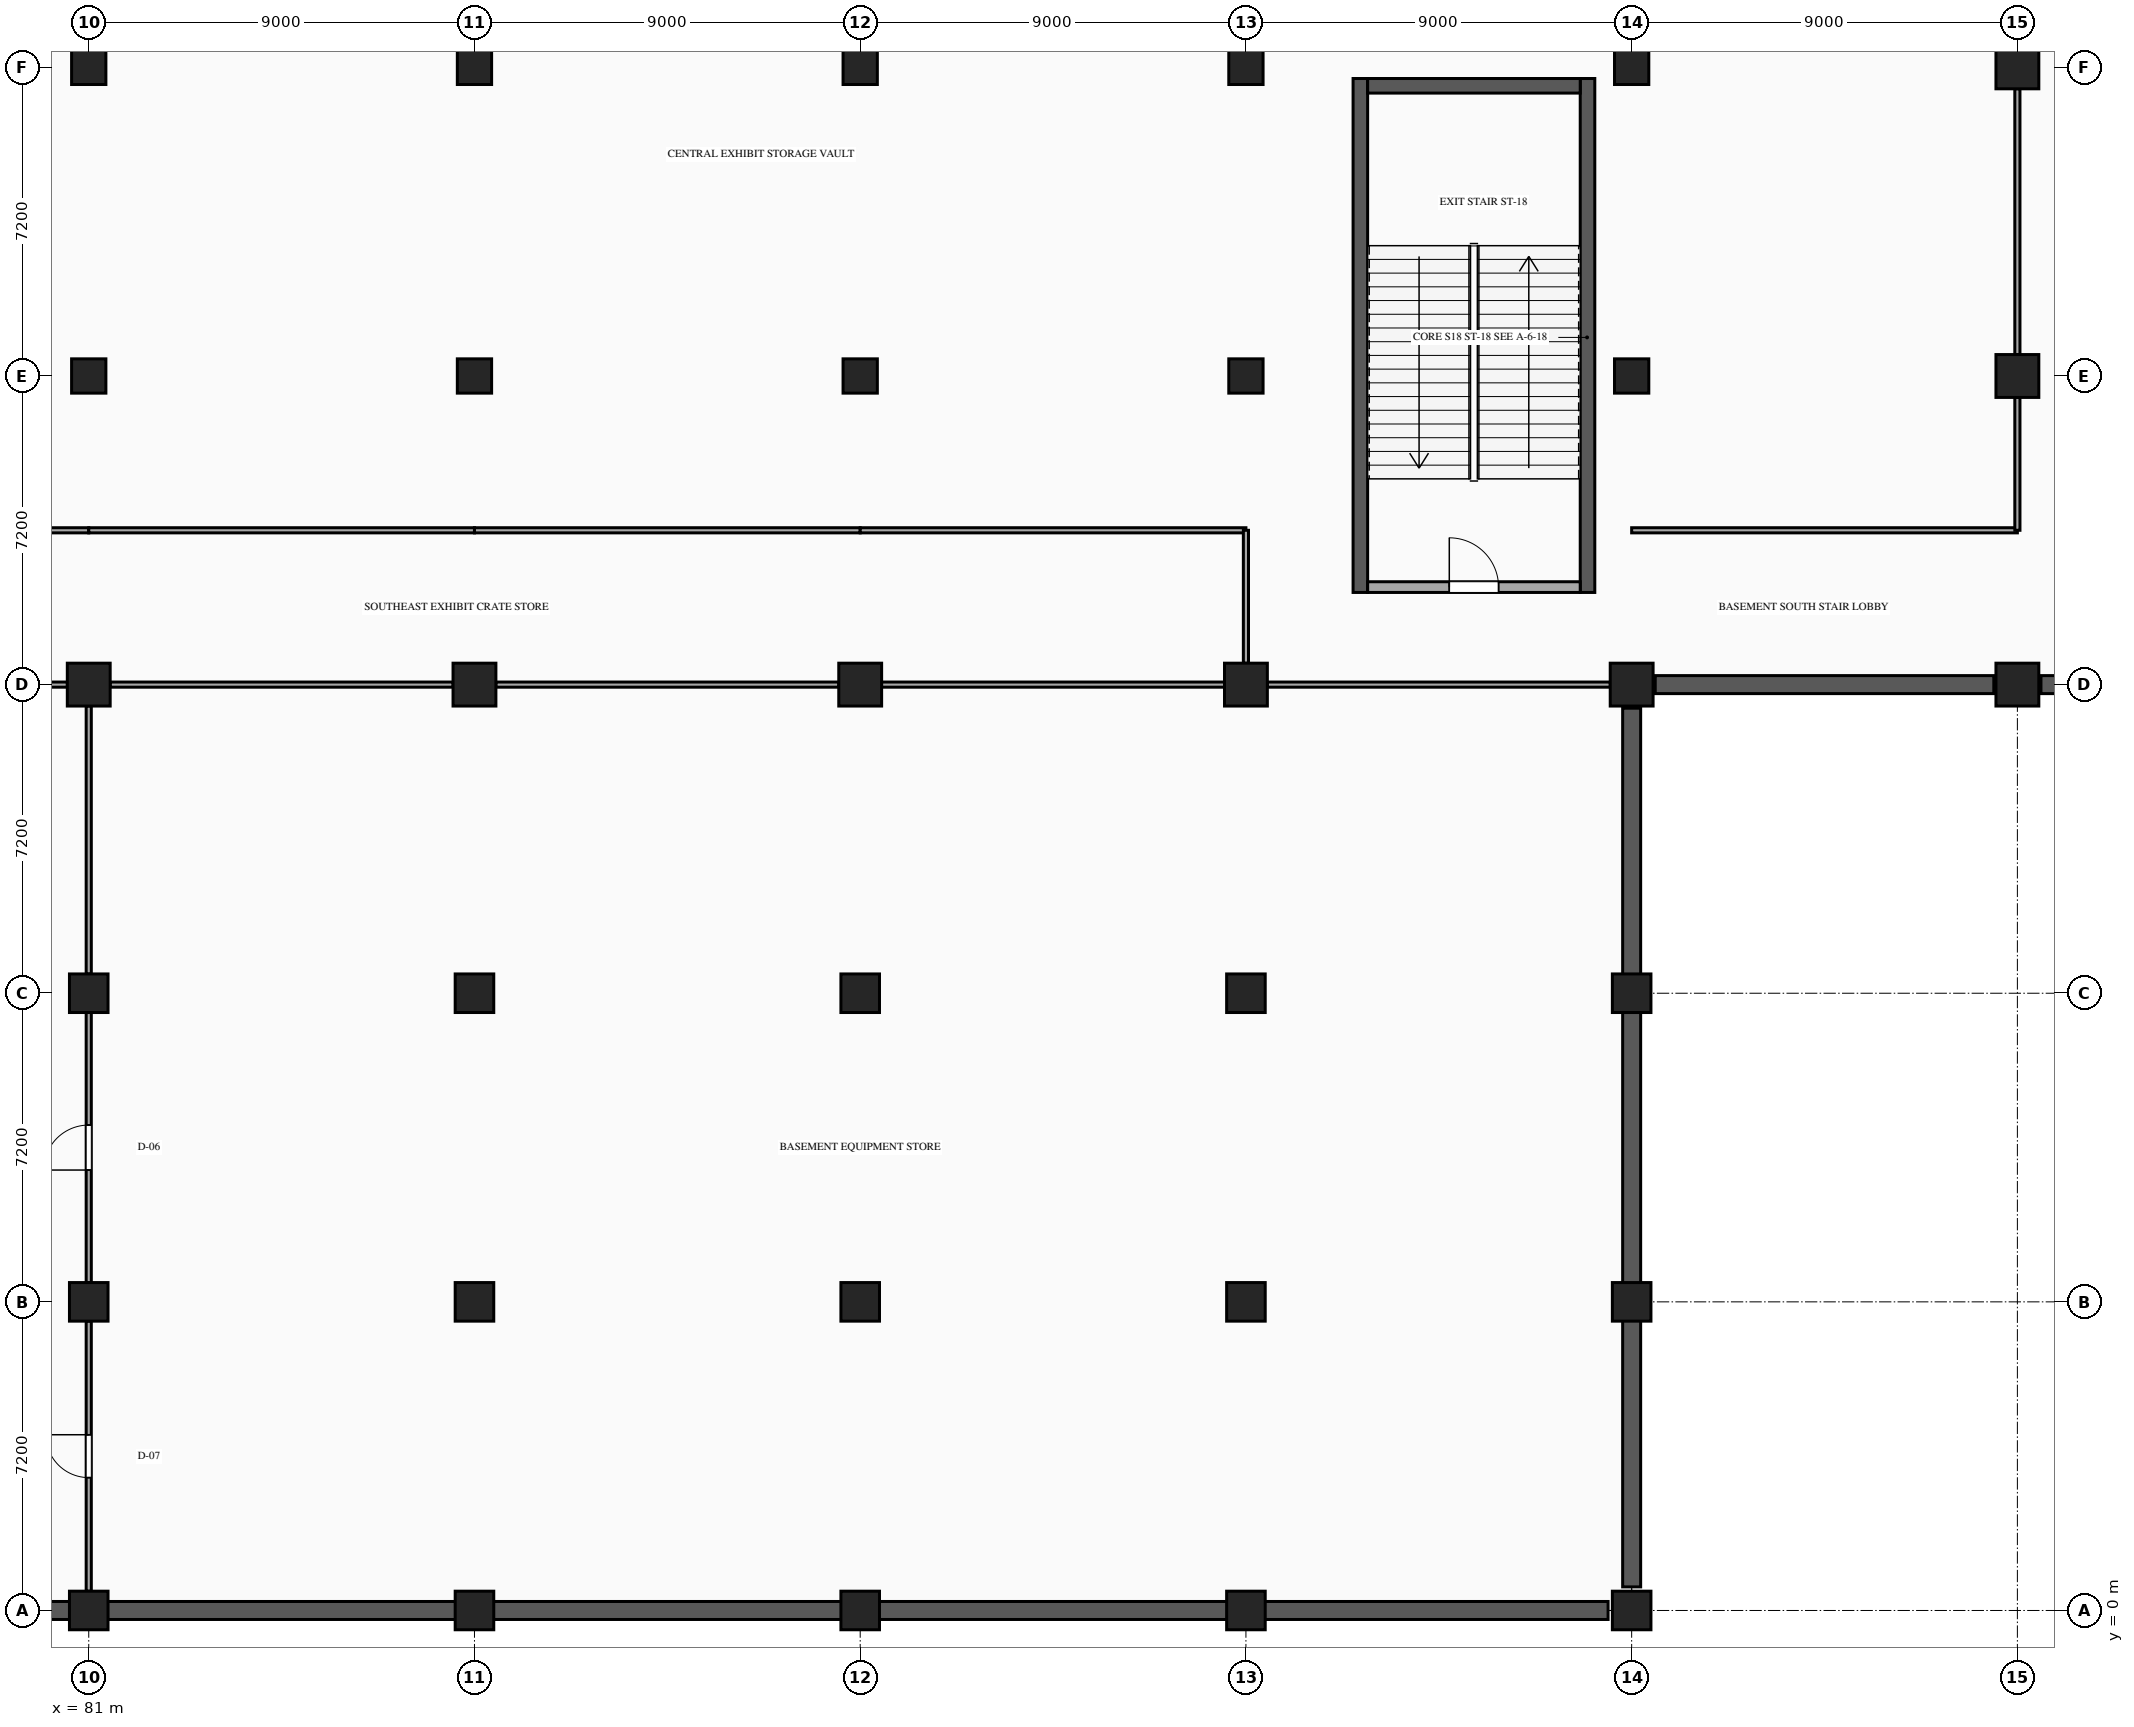
"""IFC4 building model, lengths in metres.
Left out: names, types, materials, properties, quantities, classifications, styles, units other than length and angle.
Written with IfcOpenShell. Run it as: python <this file> out.ifc"""

import sys

from ifc_helpers import new_model, si_unit, direction, frame, frame_2d, origin, origin_2d, place, context, subcontext, project, spatial, rectangle, extrude, element, fill, save


model = new_model("IFC4")
c1 = context("Model", 3, precision=1e-05, world=origin(), true_north=direction((0.0, 1.0)))
c2 = subcontext(c1, "Body", "Model", "MODEL_VIEW")
j1 = project(units=[si_unit("LENGTHUNIT", "METRE"), si_unit("PLANEANGLEUNIT", "RADIAN")], contexts=[c1])
p1 = place(None, origin())
s1 = spatial("IfcSite", under=j1, at=p1, CompositionType="ELEMENT")
p2 = place(p1, origin())
s2 = spatial("IfcBuilding", under=s1, at=p2, CompositionType="ELEMENT")
p3 = place(p2, frame((0.0, 0.0, -5.4)))
s3 = spatial("IfcBuildingStorey", under=s2, at=p3, CompositionType="ELEMENT", Elevation=-5.4)
for number, where, z_axis, x_axis in (
    (1, (81.0, 0.0, 0.0), (0.0, 0.0, 1.0), (1.0, 0.0, 0.0)),
    (2, (81.0, 7.2, 0.0), (0.0, 0.0, 1.0), (1.0, 0.0, 0.0)),
    (3, (81.0, 14.4, 0.0), (0.0, 0.0, 1.0), (1.0, 0.0, 0.0)),
):
    element("IfcColumn", number, at=place(p3, frame(where, z_axis=z_axis, x_axis=x_axis)), inside=s3, PredefinedType="COLUMN", context=c2, shape_type="SweptSolid", body=[
        extrude(rectangle(XDim=0.9, YDim=0.9, at=origin_2d()), origin(), (0.0, 0.0, 1.0), 5.4),
    ])
p4 = place(p3, frame((81.0, 21.6, 0.0), z_axis=(0.0, 0.0, 1.0), x_axis=(1.0, 0.0, 0.0)))
e4 = element("IfcColumn", 4, at=p4, inside=s3, PredefinedType="COLUMN", context=c2, shape_type="SweptSolid", body=[
    extrude(rectangle(XDim=1.0, YDim=1.0, at=origin_2d()), origin(), (0.0, 0.0, 1.0), 5.4),
])
for number, where, z_axis, x_axis in (
    (5, (81.0, 28.8, 0.0), (0.0, 0.0, 1.0), (1.0, 0.0, 0.0)),
    (6, (81.0, 36.0, 0.0), (0.0, 0.0, 1.0), (1.0, 0.0, 0.0)),
):
    element("IfcColumn", number, at=place(p3, frame(where, z_axis=z_axis, x_axis=x_axis)), inside=s3, PredefinedType="COLUMN", context=c2, shape_type="SweptSolid", body=[
        extrude(rectangle(XDim=0.8, YDim=0.8, at=origin_2d()), origin(), (0.0, 0.0, 1.0), 5.4),
    ])
for number, where, z_axis, x_axis in (
    (7, (90.0, 0.0, 0.0), (0.0, 0.0, 1.0), (1.0, 0.0, 0.0)),
    (8, (90.0, 7.2, 0.0), (0.0, 0.0, 1.0), (1.0, 0.0, 0.0)),
    (9, (90.0, 14.4, 0.0), (0.0, 0.0, 1.0), (1.0, 0.0, 0.0)),
):
    element("IfcColumn", number, at=place(p3, frame(where, z_axis=z_axis, x_axis=x_axis)), inside=s3, PredefinedType="COLUMN", context=c2, shape_type="SweptSolid", body=[
        extrude(rectangle(XDim=0.9, YDim=0.9, at=origin_2d()), origin(), (0.0, 0.0, 1.0), 5.4),
    ])
p5 = place(p3, frame((90.0, 21.6, 0.0), z_axis=(0.0, 0.0, 1.0), x_axis=(1.0, 0.0, 0.0)))
e10 = element("IfcColumn", 10, at=p5, inside=s3, PredefinedType="COLUMN", context=c2, shape_type="SweptSolid", body=[
    extrude(rectangle(XDim=1.0, YDim=1.0, at=origin_2d()), origin(), (0.0, 0.0, 1.0), 5.4),
])
for number, where, z_axis, x_axis in (
    (11, (90.0, 28.8, 0.0), (0.0, 0.0, 1.0), (1.0, 0.0, 0.0)),
    (12, (90.0, 36.0, 0.0), (0.0, 0.0, 1.0), (1.0, 0.0, 0.0)),
):
    element("IfcColumn", number, at=place(p3, frame(where, z_axis=z_axis, x_axis=x_axis)), inside=s3, PredefinedType="COLUMN", context=c2, shape_type="SweptSolid", body=[
        extrude(rectangle(XDim=0.8, YDim=0.8, at=origin_2d()), origin(), (0.0, 0.0, 1.0), 5.4),
    ])
for number, where, z_axis, x_axis in (
    (13, (99.0, 0.0, 0.0), (0.0, 0.0, 1.0), (1.0, 0.0, 0.0)),
    (14, (99.0, 7.2, 0.0), (0.0, 0.0, 1.0), (1.0, 0.0, 0.0)),
    (15, (99.0, 14.4, 0.0), (0.0, 0.0, 1.0), (1.0, 0.0, 0.0)),
):
    element("IfcColumn", number, at=place(p3, frame(where, z_axis=z_axis, x_axis=x_axis)), inside=s3, PredefinedType="COLUMN", context=c2, shape_type="SweptSolid", body=[
        extrude(rectangle(XDim=0.9, YDim=0.9, at=origin_2d()), origin(), (0.0, 0.0, 1.0), 5.4),
    ])
p6 = place(p3, frame((99.0, 21.6, 0.0), z_axis=(0.0, 0.0, 1.0), x_axis=(1.0, 0.0, 0.0)))
e16 = element("IfcColumn", 16, at=p6, inside=s3, PredefinedType="COLUMN", context=c2, shape_type="SweptSolid", body=[
    extrude(rectangle(XDim=1.0, YDim=1.0, at=origin_2d()), origin(), (0.0, 0.0, 1.0), 5.4),
])
for number, where, z_axis, x_axis in (
    (17, (99.0, 28.8, 0.0), (0.0, 0.0, 1.0), (1.0, 0.0, 0.0)),
    (18, (99.0, 36.0, 0.0), (0.0, 0.0, 1.0), (1.0, 0.0, 0.0)),
):
    element("IfcColumn", number, at=place(p3, frame(where, z_axis=z_axis, x_axis=x_axis)), inside=s3, PredefinedType="COLUMN", context=c2, shape_type="SweptSolid", body=[
        extrude(rectangle(XDim=0.8, YDim=0.8, at=origin_2d()), origin(), (0.0, 0.0, 1.0), 5.4),
    ])
for number, where, z_axis, x_axis in (
    (19, (108.0, 0.0, 0.0), (0.0, 0.0, 1.0), (1.0, 0.0, 0.0)),
    (20, (108.0, 7.2, 0.0), (0.0, 0.0, 1.0), (1.0, 0.0, 0.0)),
    (21, (108.0, 14.4, 0.0), (0.0, 0.0, 1.0), (1.0, 0.0, 0.0)),
):
    element("IfcColumn", number, at=place(p3, frame(where, z_axis=z_axis, x_axis=x_axis)), inside=s3, PredefinedType="COLUMN", context=c2, shape_type="SweptSolid", body=[
        extrude(rectangle(XDim=0.9, YDim=0.9, at=origin_2d()), origin(), (0.0, 0.0, 1.0), 5.4),
    ])
p7 = place(p3, frame((108.0, 21.6, 0.0), z_axis=(0.0, 0.0, 1.0), x_axis=(1.0, 0.0, 0.0)))
e22 = element("IfcColumn", 22, at=p7, inside=s3, PredefinedType="COLUMN", context=c2, shape_type="SweptSolid", body=[
    extrude(rectangle(XDim=1.0, YDim=1.0, at=origin_2d()), origin(), (0.0, 0.0, 1.0), 5.4),
])
for number, where, z_axis, x_axis in (
    (23, (108.0, 28.8, 0.0), (0.0, 0.0, 1.0), (1.0, 0.0, 0.0)),
    (24, (108.0, 36.0, 0.0), (0.0, 0.0, 1.0), (1.0, 0.0, 0.0)),
):
    element("IfcColumn", number, at=place(p3, frame(where, z_axis=z_axis, x_axis=x_axis)), inside=s3, PredefinedType="COLUMN", context=c2, shape_type="SweptSolid", body=[
        extrude(rectangle(XDim=0.8, YDim=0.8, at=origin_2d()), origin(), (0.0, 0.0, 1.0), 5.4),
    ])
for number, where, z_axis, x_axis in (
    (25, (117.0, 0.0, 0.0), (0.0, 0.0, 1.0), (1.0, 0.0, 0.0)),
    (26, (117.0, 7.2, 0.0), (0.0, 0.0, 1.0), (1.0, 0.0, 0.0)),
    (27, (117.0, 14.4, 0.0), (0.0, 0.0, 1.0), (1.0, 0.0, 0.0)),
):
    element("IfcColumn", number, at=place(p3, frame(where, z_axis=z_axis, x_axis=x_axis)), inside=s3, PredefinedType="COLUMN", context=c2, shape_type="SweptSolid", body=[
        extrude(rectangle(XDim=0.9, YDim=0.9, at=origin_2d()), origin(), (0.0, 0.0, 1.0), 5.4),
    ])
p8 = place(p3, frame((117.0, 21.6, 0.0), z_axis=(0.0, 0.0, 1.0), x_axis=(1.0, 0.0, 0.0)))
e28 = element("IfcColumn", 28, at=p8, inside=s3, PredefinedType="COLUMN", context=c2, shape_type="SweptSolid", body=[
    extrude(rectangle(XDim=1.0, YDim=1.0, at=origin_2d()), origin(), (0.0, 0.0, 1.0), 5.4),
])
for number, where, z_axis, x_axis in (
    (29, (117.0, 28.8, 0.0), (0.0, 0.0, 1.0), (1.0, 0.0, 0.0)),
    (30, (117.0, 36.0, 0.0), (0.0, 0.0, 1.0), (1.0, 0.0, 0.0)),
):
    element("IfcColumn", number, at=place(p3, frame(where, z_axis=z_axis, x_axis=x_axis)), inside=s3, PredefinedType="COLUMN", context=c2, shape_type="SweptSolid", body=[
        extrude(rectangle(XDim=0.8, YDim=0.8, at=origin_2d()), origin(), (0.0, 0.0, 1.0), 5.4),
    ])
for number, where, z_axis, x_axis in (
    (31, (126.0, 21.6, 0.0), (0.0, 0.0, 1.0), (1.0, 0.0, 0.0)),
    (32, (126.0, 28.8, 0.0), (0.0, 0.0, 1.0), (1.0, 0.0, 0.0)),
    (33, (126.0, 36.0, 0.0), (0.0, 0.0, 1.0), (1.0, 0.0, 0.0)),
):
    element("IfcColumn", number, at=place(p3, frame(where, z_axis=z_axis, x_axis=x_axis)), inside=s3, PredefinedType="COLUMN", context=c2, shape_type="SweptSolid", body=[
        extrude(rectangle(XDim=1.0, YDim=1.0, at=origin_2d()), origin(), (0.0, 0.0, 1.0), 5.4),
    ])
p9 = place(p3, frame((143.45, 21.6, 0.0), z_axis=(0.0, 0.0, 1.0), x_axis=(-1.0, 0.0, 0.0)))
e34 = element("IfcWall", 34, at=p9, inside=s3, PredefinedType="USERDEFINED", context=c2, shape_type="SweptSolid", body=[
    extrude(rectangle(XDim=16.9, YDim=0.42, at=frame_2d((8.45, 0.0))), origin(), (0.0, 0.0, 1.0), 4.08),
])
p10 = place(p3, frame((125.45, 21.6, 0.0), z_axis=(0.0, 0.0, 1.0), x_axis=(-1.0, 0.0, 0.0)))
e35 = element("IfcWall", 35, at=p10, inside=s3, PredefinedType="USERDEFINED", context=c2, shape_type="SweptSolid", body=[
    extrude(rectangle(XDim=7.9, YDim=0.42, at=frame_2d((3.95, 0.0))), origin(), (0.0, 0.0, 1.0), 4.08),
])
p11 = place(p3, frame((117.0, 21.05, 0.0), z_axis=(0.0, 0.0, 1.0), x_axis=(0.0, -1.0, 0.0)))
e36 = element("IfcWall", 36, at=p11, inside=s3, PredefinedType="USERDEFINED", context=c2, shape_type="SweptSolid", body=[
    extrude(rectangle(XDim=20.5, YDim=0.42, at=frame_2d((10.25, 0.0))), origin(), (0.0, 0.0, 1.0), 4.08),
])
p12 = place(p3, frame((116.45, 0.0, 0.0), z_axis=(0.0, 0.0, 1.0), x_axis=(-1.0, 0.0, 0.0)))
e37 = element("IfcWall", 37, at=p12, inside=s3, PredefinedType="USERDEFINED", context=c2, shape_type="SweptSolid", body=[
    extrude(rectangle(XDim=79.9, YDim=0.42, at=frame_2d((39.95, 0.0))), origin(), (0.0, 0.0, 1.0), 4.08),
])
for number, where, z_axis, x_axis in (
    (38, (110.67, 23.75, 0.0), (0.0, 0.0, 1.0), (0.0, 1.0, 0.0)),
    (39, (115.97, 35.74, 0.0), (0.0, 0.0, 1.0), (0.0, -1.0, 0.0)),
):
    element("IfcWall", number, at=place(p3, frame(where, z_axis=z_axis, x_axis=x_axis)), inside=s3, PredefinedType="SHEAR", context=c2, shape_type="SweptSolid", body=[
        extrude(rectangle(XDim=11.99, YDim=0.34, at=frame_2d((5.995, 0.0))), origin(), (0.0, 0.0, 1.0), 5.04),
    ])
p13 = place(p3, frame((110.84, 35.57, 0.0), z_axis=(0.0, 0.0, 1.0), x_axis=(1.0, 0.0, 0.0)))
e40 = element("IfcWall", 40, at=p13, inside=s3, PredefinedType="SHEAR", context=c2, shape_type="SweptSolid", body=[
    extrude(rectangle(XDim=4.96, YDim=0.34, at=frame_2d((2.48, 0.0))), origin(), (0.0, 0.0, 1.0), 5.04),
])
p14 = place(p3, frame((110.84, 23.875, 0.0), z_axis=(0.0, 0.0, 1.0), x_axis=(1.0, 0.0, 0.0)))
e41 = element("IfcWall", 41, at=p14, inside=s3, PredefinedType="STANDARD", context=c2, shape_type="SweptSolid", body=[
    extrude(rectangle(XDim=4.96, YDim=0.25, at=frame_2d((2.48, 0.0))), origin(), (0.0, 0.0, 1.0), 4.95),
])
p15 = place(p14, frame((1.905, 0.0, 0.0)))
e42 = element("IfcOpeningElement", 42, at=p15, cuts=e41, PredefinedType="OPENING", context=c2, shape_type="SweptSolid", body=[
    extrude(rectangle(XDim=1.15, YDim=2.2, at=frame_2d((0.575, 1.1))), frame((0.0, 0.135, 0.0), z_axis=(0.0, -1.0, 0.0), x_axis=(1.0, 0.0, 0.0)), (0.0, 0.0, 1.0), 0.27),
])
p16 = place(p3, frame((76.5, 21.6, 0.0), z_axis=(0.0, 0.0, 1.0), x_axis=(1.0, 0.0, 0.0)))
e43 = element("IfcWall", 43, at=p16, inside=s3, PredefinedType="PARTITIONING", context=c2, shape_type="SweptSolid", body=[
    extrude(rectangle(XDim=4.002, YDim=0.12, at=frame_2d((2.001, 0.0))), origin(), (0.0, 0.0, 1.0), 4.113),
])
for number, where, z_axis, x_axis in (
    (44, (81.498, 21.6, 0.0), (0.0, 0.0, 1.0), (1.0, 0.0, 0.0)),
    (45, (90.498, 21.6, 0.0), (0.0, 0.0, 1.0), (1.0, 0.0, 0.0)),
    (46, (99.498, 21.6, 0.0), (0.0, 0.0, 1.0), (1.0, 0.0, 0.0)),
    (47, (108.498, 21.6, 0.0), (0.0, 0.0, 1.0), (1.0, 0.0, 0.0)),
):
    element("IfcWall", number, at=place(p3, frame(where, z_axis=z_axis, x_axis=x_axis)), inside=s3, PredefinedType="PARTITIONING", context=c2, shape_type="SweptSolid", body=[
        extrude(rectangle(XDim=8.004, YDim=0.12, at=frame_2d((4.002, 0.0))), origin(), (0.0, 0.0, 1.0), 4.113),
    ])
p17 = place(p3, frame((76.5, 25.2, 0.0), z_axis=(0.0, 0.0, 1.0), x_axis=(1.0, 0.0, 0.0)))
e48 = element("IfcWall", 48, at=p17, inside=s3, PredefinedType="PARTITIONING", context=c2, shape_type="SweptSolid", body=[
    extrude(rectangle(XDim=4.5, YDim=0.12, at=frame_2d((2.25, 0.0))), origin(), (0.0, 0.0, 1.0), 4.268),
])
for number, where, z_axis, x_axis in (
    (49, (81.0, 25.2, 0.0), (0.0, 0.0, 1.0), (1.0, 0.0, 0.0)),
    (50, (90.0, 25.2, 0.0), (0.0, 0.0, 1.0), (1.0, 0.0, 0.0)),
    (51, (99.0, 25.2, 0.0), (0.0, 0.0, 1.0), (1.0, 0.0, 0.0)),
    (52, (117.0, 25.2, 0.0), (0.0, 0.0, 1.0), (1.0, 0.0, 0.0)),
):
    element("IfcWall", number, at=place(p3, frame(where, z_axis=z_axis, x_axis=x_axis)), inside=s3, PredefinedType="PARTITIONING", context=c2, shape_type="SweptSolid", body=[
        extrude(rectangle(XDim=9.0, YDim=0.12, at=frame_2d((4.5, 0.0))), origin(), (0.0, 0.0, 1.0), 4.268),
    ])
p18 = place(p3, frame((81.0, 0.448, 0.0), z_axis=(0.0, 0.0, 1.0), x_axis=(0.0, 1.0, 0.0)))
e53 = element("IfcWall", 53, at=p18, inside=s3, PredefinedType="PARTITIONING", context=c2, shape_type="SweptSolid", body=[
    extrude(rectangle(XDim=6.304, YDim=0.12, at=frame_2d((3.152, 0.0))), origin(), (0.0, 0.0, 1.0), 4.397),
])
p19 = place(p18, frame((2.652, 0.0, 0.0)))
e54 = element("IfcOpeningElement", 54, at=p19, cuts=e53, PredefinedType="OPENING", context=c2, shape_type="SweptSolid", body=[
    extrude(rectangle(XDim=1.0, YDim=2.15, at=frame_2d((0.5, 1.075))), frame((0.0, 0.07, 0.0), z_axis=(0.0, -1.0, 0.0), x_axis=(1.0, 0.0, 0.0)), (0.0, 0.0, 1.0), 0.14),
])
p20 = place(p3, frame((81.0, 7.648, 0.0), z_axis=(0.0, 0.0, 1.0), x_axis=(0.0, 1.0, 0.0)))
e55 = element("IfcWall", 55, at=p20, inside=s3, PredefinedType="PARTITIONING", context=c2, shape_type="SweptSolid", body=[
    extrude(rectangle(XDim=6.304, YDim=0.12, at=frame_2d((3.152, 0.0))), origin(), (0.0, 0.0, 1.0), 4.397),
])
p21 = place(p20, frame((2.627, 0.0, 0.0)))
e56 = element("IfcOpeningElement", 56, at=p21, cuts=e55, PredefinedType="OPENING", context=c2, shape_type="SweptSolid", body=[
    extrude(rectangle(XDim=1.05, YDim=2.15, at=frame_2d((0.525, 1.075))), frame((0.0, 0.07, 0.0), z_axis=(0.0, -1.0, 0.0), x_axis=(1.0, 0.0, 0.0)), (0.0, 0.0, 1.0), 0.14),
])
p22 = place(p3, frame((81.0, 14.848, 0.0), z_axis=(0.0, 0.0, 1.0), x_axis=(0.0, 1.0, 0.0)))
e57 = element("IfcWall", 57, at=p22, inside=s3, PredefinedType="PARTITIONING", context=c2, shape_type="SweptSolid", body=[
    extrude(rectangle(XDim=6.254, YDim=0.12, at=frame_2d((3.127, 0.0))), origin(), (0.0, 0.0, 1.0), 4.397),
])
for number, where, z_axis, x_axis in (
    (58, (108.0, 22.098, 0.0), (0.0, 0.0, 1.0), (0.0, 1.0, 0.0)),
    (59, (126.0, 25.2, 0.0), (0.0, 0.0, 1.0), (0.0, 1.0, 0.0)),
):
    element("IfcWall", number, at=place(p3, frame(where, z_axis=z_axis, x_axis=x_axis)), inside=s3, PredefinedType="PARTITIONING", context=c2, shape_type="SweptSolid", body=[
        extrude(rectangle(XDim=3.102, YDim=0.12, at=frame_2d((1.551, 0.0))), origin(), (0.0, 0.0, 1.0), 4.268),
    ])
p23 = place(p3, frame((126.0, 29.298, 0.0), z_axis=(0.0, 0.0, 1.0), x_axis=(0.0, 1.0, 0.0)))
e60 = element("IfcWall", 60, at=p23, inside=s3, PredefinedType="PARTITIONING", context=c2, shape_type="SweptSolid", body=[
    extrude(rectangle(XDim=6.204, YDim=0.12, at=frame_2d((3.102, 0.0))), origin(), (0.0, 0.0, 1.0), 4.268),
])
p24 = place(p15, origin())
e61 = element("IfcDoor", 61, at=p24, inside=s3, OperationType="SINGLE_SWING_LEFT", PredefinedType="DOOR", context=c2, shape_type="SweptSolid", body=[
    extrude(rectangle(XDim=1.15, YDim=2.2, at=frame_2d((0.575, 1.1))), frame((0.0, 0.025, 0.0), z_axis=(0.0, -1.0, 0.0), x_axis=(1.0, 0.0, 0.0)), (0.0, 0.0, 1.0), 0.05),
])
fill(e42, e61)
p25 = place(p19, origin())
e62 = element("IfcDoor", 62, at=p25, inside=s3, OperationType="SINGLE_SWING_RIGHT", PredefinedType="DOOR", context=c2, shape_type="SweptSolid", body=[
    extrude(rectangle(XDim=1.0, YDim=2.15, at=frame_2d((0.5, 1.075))), frame((0.0, 0.025, 0.0), z_axis=(0.0, -1.0, 0.0), x_axis=(1.0, 0.0, 0.0)), (0.0, 0.0, 1.0), 0.05),
])
fill(e54, e62)
p26 = place(p21, origin())
e63 = element("IfcDoor", 63, at=p26, inside=s3, OperationType="SINGLE_SWING_LEFT", PredefinedType="DOOR", context=c2, shape_type="SweptSolid", body=[
    extrude(rectangle(XDim=1.05, YDim=2.15, at=frame_2d((0.525, 1.075))), frame((0.0, 0.025, 0.0), z_axis=(0.0, -1.0, 0.0), x_axis=(1.0, 0.0, 0.0)), (0.0, 0.0, 1.0), 0.05),
])
fill(e56, e63)
save(model, sys.argv[1])
